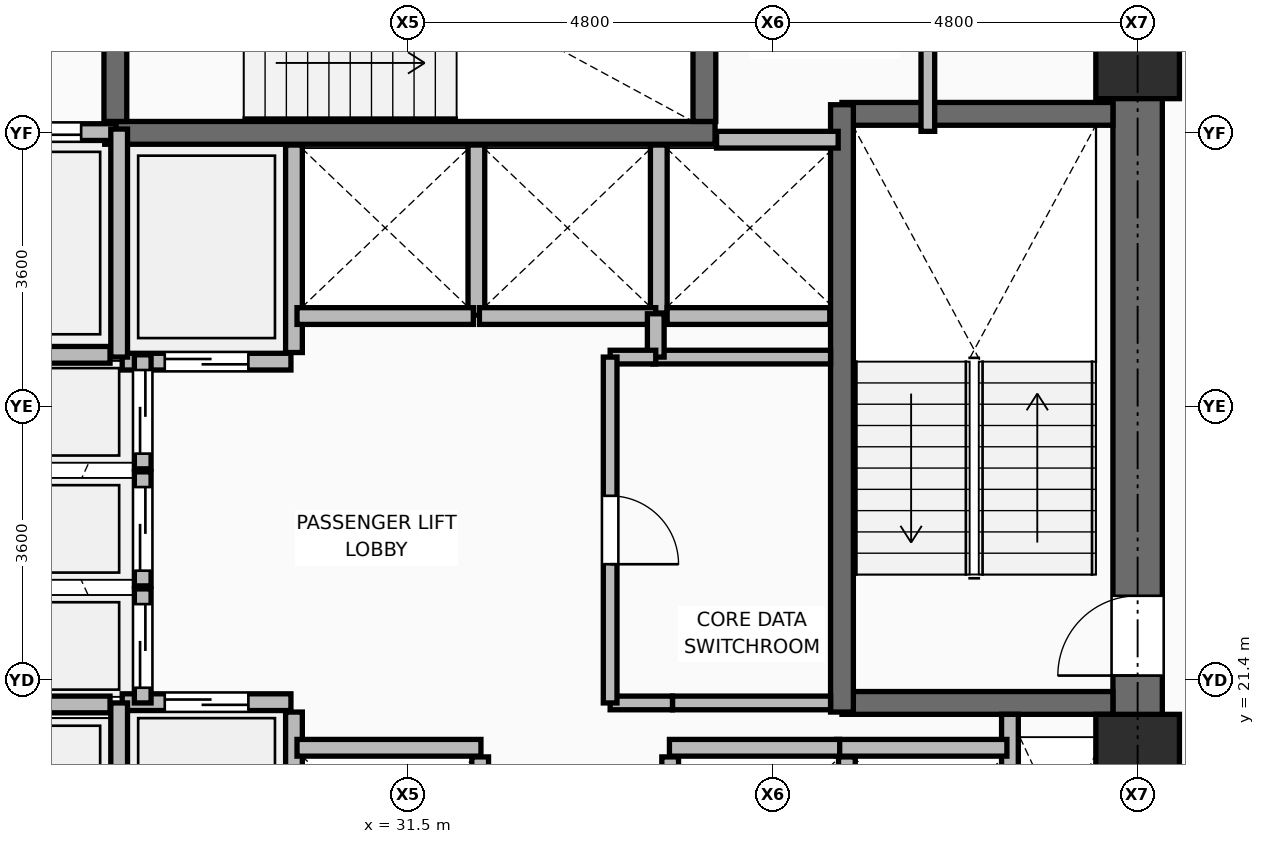
"""IFC4 building model, lengths in metres.
Left out: names, types, materials, properties, quantities, classifications, styles, units other than length and angle.
Written with IfcOpenShell. Run it as: python <this file> out.ifc"""

import sys

from ifc_helpers import new_model, si_unit, direction, frame, frame_2d, origin, origin_2d, place, context, subcontext, project, spatial, rectangle, extrude, element, fill, save


model = new_model("IFC4")
c1 = context("Model", 3, precision=1e-05, world=origin(), true_north=direction((0.0, 1.0)))
c2 = subcontext(c1, "Body", "Model", "MODEL_VIEW")
j1 = project(units=[si_unit("LENGTHUNIT", "METRE"), si_unit("PLANEANGLEUNIT", "RADIAN")], contexts=[c1])
p1 = place(None, origin())
s1 = spatial("IfcSite", under=j1, at=p1, CompositionType="ELEMENT")
p2 = place(p1, origin())
s2 = spatial("IfcBuilding", under=s1, at=p2, CompositionType="ELEMENT")
p3 = place(p2, frame((0.0, 0.0, 72.0)))
s3 = spatial("IfcBuildingStorey", under=s2, at=p3, CompositionType="ELEMENT", Elevation=72.0)
for number, where, z_axis, x_axis in (
    (1, (41.1, 20.4, 0.0), (0.0, 0.0, 1.0), (1.0, 0.0, 0.0)),
    (2, (41.1, 29.6, 0.0), (0.0, 0.0, 1.0), (1.0, 0.0, 0.0)),
):
    element("IfcColumn", number, at=place(p3, frame(where, z_axis=z_axis, x_axis=x_axis)), inside=s3, PredefinedType="COLUMN", context=c2, shape_type="SweptSolid", body=[
        extrude(rectangle(XDim=1.1, YDim=1.1, at=origin_2d()), origin(), (0.0, 0.0, 1.0), 3.75),
    ])
p4 = place(p3, frame((30.0, 18.08, 0.0), z_axis=(0.0, 0.0, 1.0), x_axis=(0.0, 1.0, 0.0)))
e3 = element("IfcWall", 3, at=p4, inside=s3, PredefinedType="PARTITIONING", context=c2, shape_type="SweptSolid", body=[
    extrude(rectangle(XDim=2.9, YDim=0.22, at=frame_2d((1.45, 0.0))), origin(), (0.0, 0.0, 1.0), 3.545),
])
for number, where, z_axis, x_axis in (
    (4, (32.45, 17.92, 0.0), (0.0, 0.0, 1.0), (0.0, 1.0, 0.0)),
    (5, (34.95, 17.92, 0.0), (0.0, 0.0, 1.0), (0.0, 1.0, 0.0)),
):
    element("IfcWall", number, at=place(p3, frame(where, z_axis=z_axis, x_axis=x_axis)), inside=s3, PredefinedType="PARTITIONING", context=c2, shape_type="SweptSolid", body=[
        extrude(rectangle(XDim=2.47, YDim=0.22, at=frame_2d((1.235, 0.0))), origin(), (0.0, 0.0, 1.0), 2.928),
    ])
p5 = place(p3, frame((37.275, 18.08, 0.0), z_axis=(0.0, 0.0, 1.0), x_axis=(0.0, 1.0, 0.0)))
e6 = element("IfcWall", 6, at=p5, inside=s3, PredefinedType="PARTITIONING", context=c2, shape_type="SweptSolid", body=[
    extrude(rectangle(XDim=2.31, YDim=0.22, at=frame_2d((1.155, 0.0))), origin(), (0.0, 0.0, 1.0), 3.545),
])
p6 = place(p3, frame((30.0, 25.71, 0.0), z_axis=(0.0, 0.0, 1.0), x_axis=(0.0, 1.0, 0.0)))
e7 = element("IfcWall", 7, at=p6, inside=s3, PredefinedType="PARTITIONING", context=c2, shape_type="SweptSolid", body=[
    extrude(rectangle(XDim=2.73, YDim=0.22, at=frame_2d((1.365, 0.0))), origin(), (0.0, 0.0, 1.0), 3.545),
])
p7 = place(p3, frame((32.4, 26.2, 0.0), z_axis=(0.0, 0.0, 1.0), x_axis=(0.0, 1.0, 0.0)))
e8 = element("IfcWall", 8, at=p7, inside=s3, PredefinedType="PARTITIONING", context=c2, shape_type="SweptSolid", body=[
    extrude(rectangle(XDim=2.24, YDim=0.22, at=frame_2d((1.12, 0.0))), origin(), (0.0, 0.0, 1.0), 3.545),
])
p8 = place(p3, frame((34.8, 26.23, 0.0), z_axis=(0.0, 0.0, 1.0), x_axis=(0.0, 1.0, 0.0)))
e9 = element("IfcWall", 9, at=p8, inside=s3, PredefinedType="PARTITIONING", context=c2, shape_type="SweptSolid", body=[
    extrude(rectangle(XDim=2.21, YDim=0.22, at=frame_2d((1.105, 0.0))), origin(), (0.0, 0.0, 1.0), 3.545),
])
p9 = place(p3, frame((34.91, 26.19, 0.0), z_axis=(0.0, 0.0, 1.0), x_axis=(1.0, 0.0, 0.0)))
e10 = element("IfcWall", 10, at=p9, inside=s3, PredefinedType="PARTITIONING", context=c2, shape_type="SweptSolid", body=[
    extrude(rectangle(XDim=2.14, YDim=0.22, at=frame_2d((1.07, 0.0))), origin(), (0.0, 0.0, 1.0), 3.545),
])
p10 = place(p3, frame((41.1, 18.125, 0.0), z_axis=(0.0, 0.0, 1.0), x_axis=(0.0, 1.0, 0.0)))
e11 = element("IfcWall", 11, at=p10, inside=s3, PredefinedType="SHEAR", context=c2, shape_type="SweptSolid", body=[
    extrude(rectangle(XDim=14.0, YDim=0.65, at=frame_2d((7.0, 0.0))), origin(), (0.0, 0.0, 1.0), 3.57),
])
p11 = place(p10, frame((3.335, 0.0, 0.0)))
e12 = element("IfcOpeningElement", 12, at=p11, cuts=e11, PredefinedType="OPENING", context=c2, shape_type="SweptSolid", body=[
    extrude(rectangle(XDim=1.05, YDim=2.1, at=frame_2d((0.525, 1.05))), frame((0.0, 0.335, 0.0), z_axis=(0.0, -1.0, 0.0), x_axis=(1.0, 0.0, 0.0)), (0.0, 0.0, 1.0), 0.67),
])
for number, where, z_axis, x_axis in (
    (13, (37.21, 21.1, 0.0), (0.0, 0.0, 1.0), (1.0, 0.0, 0.0)),
    (14, (37.21, 28.85, 0.0), (0.0, 0.0, 1.0), (1.0, 0.0, 0.0)),
):
    element("IfcWall", number, at=place(p3, frame(where, z_axis=z_axis, x_axis=x_axis)), inside=s3, PredefinedType="SHEAR", context=c2, shape_type="SweptSolid", body=[
        extrude(rectangle(XDim=3.565, YDim=0.3, at=frame_2d((1.782, 0.0))), origin(), (0.0, 0.0, 1.0), 3.57),
    ])
p12 = place(p3, frame((37.21, 20.98, 0.0), z_axis=(0.0, 0.0, 1.0), x_axis=(0.0, 1.0, 0.0)))
e15 = element("IfcWall", 15, at=p12, inside=s3, PredefinedType="SHEAR", context=c2, shape_type="SweptSolid", body=[
    extrude(rectangle(XDim=7.99, YDim=0.3, at=frame_2d((3.995, 0.0))), origin(), (0.0, 0.0, 1.0), 3.57),
])
p13 = place(p3, frame((27.51, 28.6, 0.0), z_axis=(0.0, 0.0, 1.0), x_axis=(1.0, 0.0, 0.0)))
e16 = element("IfcWall", 16, at=p13, inside=s3, PredefinedType="SHEAR", context=c2, shape_type="SweptSolid", body=[
    extrude(rectangle(XDim=8.03, YDim=0.3, at=frame_2d((4.015, 0.0))), origin(), (0.0, 0.0, 1.0), 3.57),
])
p14 = place(p3, frame((27.65, 28.75, 0.0), z_axis=(0.0, 0.0, 1.0), x_axis=(0.0, 1.0, 0.0)))
e17 = element("IfcWall", 17, at=p14, inside=s3, PredefinedType="SHEAR", context=c2, shape_type="SweptSolid", body=[
    extrude(rectangle(XDim=3.375, YDim=0.3, at=frame_2d((1.688, 0.0))), origin(), (0.0, 0.0, 1.0), 3.57),
])
p15 = place(p14, frame((1.0, 0.0, 0.0)))
e18 = element("IfcOpeningElement", 18, at=p15, cuts=e17, PredefinedType="OPENING", context=c2, shape_type="SweptSolid", body=[
    extrude(rectangle(XDim=1.05, YDim=2.1, at=frame_2d((0.525, 1.05))), frame((0.0, 0.16, 0.0), z_axis=(0.0, -1.0, 0.0), x_axis=(1.0, 0.0, 0.0)), (0.0, 0.0, 1.0), 0.32),
])
p16 = place(p3, frame((35.4, 28.75, 0.0), z_axis=(0.0, 0.0, 1.0), x_axis=(0.0, 1.0, 0.0)))
e19 = element("IfcWall", 19, at=p16, inside=s3, PredefinedType="SHEAR", context=c2, shape_type="SweptSolid", body=[
    extrude(rectangle(XDim=3.375, YDim=0.3, at=frame_2d((1.688, 0.0))), origin(), (0.0, 0.0, 1.0), 3.57),
])
p17 = place(p3, frame((39.42, 18.125, 0.0), z_axis=(0.0, 0.0, 1.0), x_axis=(0.0, 1.0, 0.0)))
e20 = element("IfcWall", 20, at=p17, inside=s3, PredefinedType="PARTITIONING", context=c2, shape_type="SweptSolid", body=[
    extrude(rectangle(XDim=2.825, YDim=0.22, at=frame_2d((1.413, 0.0))), origin(), (0.0, 0.0, 1.0), 3.55),
])
p18 = place(p3, frame((25.64, 28.61, 0.0), z_axis=(0.0, 0.0, 1.0), x_axis=(1.0, 0.0, 0.0)))
e21 = element("IfcWall", 21, at=p18, inside=s3, PredefinedType="PARTITIONING", context=c2, shape_type="SweptSolid", body=[
    extrude(rectangle(XDim=2.02, YDim=0.22, at=frame_2d((1.01, 0.0))), origin(), (0.0, 0.0, 1.0), 3.55),
])
p19 = place(p18, frame((0.46, 0.0, 0.0)))
e22 = element("IfcOpeningElement", 22, at=p19, cuts=e21, PredefinedType="OPENING", context=c2, shape_type="SweptSolid", body=[
    extrude(rectangle(XDim=1.1, YDim=2.2, at=frame_2d((0.55, 1.1))), frame((0.0, 0.12, 0.0), z_axis=(0.0, -1.0, 0.0), x_axis=(1.0, 0.0, 0.0)), (0.0, 0.0, 1.0), 0.24),
])
p20 = place(p3, frame((27.74, 21.11, 0.0), z_axis=(0.0, 0.0, 1.0), x_axis=(1.0, 0.0, 0.0)))
e23 = element("IfcWall", 23, at=p20, inside=s3, PredefinedType="PARTITIONING", context=c2, shape_type="SweptSolid", body=[
    extrude(rectangle(XDim=2.22, YDim=0.22, at=frame_2d((1.11, 0.0))), origin(), (0.0, 0.0, 1.0), 3.55),
])
p21 = place(p20, frame((0.56, 0.0, 0.0)))
e24 = element("IfcOpeningElement", 24, at=p21, cuts=e23, PredefinedType="OPENING", context=c2, shape_type="SweptSolid", body=[
    extrude(rectangle(XDim=1.1, YDim=2.2, at=frame_2d((0.55, 1.1))), frame((0.0, 0.12, 0.0), z_axis=(0.0, -1.0, 0.0), x_axis=(1.0, 0.0, 0.0)), (0.0, 0.0, 1.0), 0.24),
])
p22 = place(p3, frame((27.74, 25.59, 0.0), z_axis=(0.0, 0.0, 1.0), x_axis=(1.0, 0.0, 0.0)))
e25 = element("IfcWall", 25, at=p22, inside=s3, PredefinedType="PARTITIONING", context=c2, shape_type="SweptSolid", body=[
    extrude(rectangle(XDim=2.22, YDim=0.22, at=frame_2d((1.11, 0.0))), origin(), (0.0, 0.0, 1.0), 3.55),
])
p23 = place(p22, frame((0.56, 0.0, 0.0)))
e26 = element("IfcOpeningElement", 26, at=p23, cuts=e25, PredefinedType="OPENING", context=c2, shape_type="SweptSolid", body=[
    extrude(rectangle(XDim=1.1, YDim=2.2, at=frame_2d((0.55, 1.1))), frame((0.0, 0.12, 0.0), z_axis=(0.0, -1.0, 0.0), x_axis=(1.0, 0.0, 0.0)), (0.0, 0.0, 1.0), 0.24),
])
p24 = place(p3, frame((30.04, 20.51, 0.0), z_axis=(0.0, 0.0, 1.0), x_axis=(1.0, 0.0, 0.0)))
e27 = element("IfcWall", 27, at=p24, inside=s3, PredefinedType="PARTITIONING", context=c2, shape_type="SweptSolid", body=[
    extrude(rectangle(XDim=2.42, YDim=0.22, at=frame_2d((1.21, 0.0))), origin(), (0.0, 0.0, 1.0), 3.55),
])
for number, where, z_axis, x_axis in (
    (28, (37.14, 20.51, 0.0), (0.0, 0.0, 1.0), (1.0, 0.0, 0.0)),
    (29, (34.94, 20.51, 0.0), (0.0, 0.0, 1.0), (1.0, 0.0, 0.0)),
):
    element("IfcWall", number, at=place(p3, frame(where, z_axis=z_axis, x_axis=x_axis)), inside=s3, PredefinedType="PARTITIONING", context=c2, shape_type="SweptSolid", body=[
        extrude(rectangle(XDim=2.24, YDim=0.22, at=frame_2d((1.12, 0.0))), origin(), (0.0, 0.0, 1.0), 3.55),
    ])
for number, where, z_axis, x_axis in (
    (30, (30.04, 26.19, 0.0), (0.0, 0.0, 1.0), (1.0, 0.0, 0.0)),
    (31, (32.44, 26.19, 0.0), (0.0, 0.0, 1.0), (1.0, 0.0, 0.0)),
):
    element("IfcWall", number, at=place(p3, frame(where, z_axis=z_axis, x_axis=x_axis)), inside=s3, PredefinedType="PARTITIONING", context=c2, shape_type="SweptSolid", body=[
        extrude(rectangle(XDim=2.32, YDim=0.22, at=frame_2d((1.16, 0.0))), origin(), (0.0, 0.0, 1.0), 3.55),
    ])
p25 = place(p3, frame((35.56, 28.51, 0.0), z_axis=(0.0, 0.0, 1.0), x_axis=(1.0, 0.0, 0.0)))
e32 = element("IfcWall", 32, at=p25, inside=s3, PredefinedType="PARTITIONING", context=c2, shape_type="SweptSolid", body=[
    extrude(rectangle(XDim=1.6, YDim=0.22, at=frame_2d((0.8, 0.0))), origin(), (0.0, 0.0, 1.0), 3.55),
])
p26 = place(p3, frame((28.01, 21.1, 0.0), z_axis=(0.0, 0.0, 1.0), x_axis=(0.0, 1.0, 0.0)))
e33 = element("IfcWall", 33, at=p26, inside=s3, PredefinedType="PARTITIONING", context=c2, shape_type="SweptSolid", body=[
    extrude(rectangle(XDim=1.5, YDim=0.22, at=frame_2d((0.75, 0.0))), origin(), (0.0, 0.0, 1.0), 3.55),
])
p27 = place(p26, frame((0.2, 0.0, 0.0)))
e34 = element("IfcOpeningElement", 34, at=p27, cuts=e33, PredefinedType="OPENING", context=c2, shape_type="SweptSolid", body=[
    extrude(rectangle(XDim=1.1, YDim=2.2, at=frame_2d((0.55, 1.1))), frame((0.0, 0.12, 0.0), z_axis=(0.0, -1.0, 0.0), x_axis=(1.0, 0.0, 0.0)), (0.0, 0.0, 1.0), 0.24),
])
p28 = place(p3, frame((28.01, 22.64, 0.0), z_axis=(0.0, 0.0, 1.0), x_axis=(0.0, 1.0, 0.0)))
e35 = element("IfcWall", 35, at=p28, inside=s3, PredefinedType="PARTITIONING", context=c2, shape_type="SweptSolid", body=[
    extrude(rectangle(XDim=1.5, YDim=0.22, at=frame_2d((0.75, 0.0))), origin(), (0.0, 0.0, 1.0), 3.55),
])
p29 = place(p28, frame((0.2, 0.0, 0.0)))
e36 = element("IfcOpeningElement", 36, at=p29, cuts=e35, PredefinedType="OPENING", context=c2, shape_type="SweptSolid", body=[
    extrude(rectangle(XDim=1.1, YDim=2.2, at=frame_2d((0.55, 1.1))), frame((0.0, 0.12, 0.0), z_axis=(0.0, -1.0, 0.0), x_axis=(1.0, 0.0, 0.0)), (0.0, 0.0, 1.0), 0.24),
])
p30 = place(p3, frame((28.01, 24.18, 0.0), z_axis=(0.0, 0.0, 1.0), x_axis=(0.0, 1.0, 0.0)))
e37 = element("IfcWall", 37, at=p30, inside=s3, PredefinedType="PARTITIONING", context=c2, shape_type="SweptSolid", body=[
    extrude(rectangle(XDim=1.5, YDim=0.22, at=frame_2d((0.75, 0.0))), origin(), (0.0, 0.0, 1.0), 3.55),
])
p31 = place(p30, frame((0.2, 0.0, 0.0)))
e38 = element("IfcOpeningElement", 38, at=p31, cuts=e37, PredefinedType="OPENING", context=c2, shape_type="SweptSolid", body=[
    extrude(rectangle(XDim=1.1, YDim=2.2, at=frame_2d((0.55, 1.1))), frame((0.0, 0.12, 0.0), z_axis=(0.0, -1.0, 0.0), x_axis=(1.0, 0.0, 0.0)), (0.0, 0.0, 1.0), 0.24),
])
p32 = place(p3, frame((27.7, 18.15, 0.0), z_axis=(0.0, 0.0, 1.0), x_axis=(0.0, 1.0, 0.0)))
e39 = element("IfcWall", 39, at=p32, inside=s3, PredefinedType="PARTITIONING", context=c2, shape_type="SweptSolid", body=[
    extrude(rectangle(XDim=2.95, YDim=0.22, at=frame_2d((1.475, 0.0))), origin(), (0.0, 0.0, 1.0), 3.55),
])
p33 = place(p3, frame((27.7, 25.65, 0.0), z_axis=(0.0, 0.0, 1.0), x_axis=(0.0, 1.0, 0.0)))
e40 = element("IfcWall", 40, at=p33, inside=s3, PredefinedType="PARTITIONING", context=c2, shape_type="SweptSolid", body=[
    extrude(rectangle(XDim=3.0, YDim=0.22, at=frame_2d((1.5, 0.0))), origin(), (0.0, 0.0, 1.0), 3.55),
])
for number, where, z_axis, x_axis in (
    (41, (25.88, 21.08, 0.0), (0.0, 0.0, 1.0), (1.0, 0.0, 0.0)),
    (42, (25.88, 25.68, 0.0), (0.0, 0.0, 1.0), (1.0, 0.0, 0.0)),
):
    element("IfcWall", number, at=place(p3, frame(where, z_axis=z_axis, x_axis=x_axis)), inside=s3, PredefinedType="PARTITIONING", context=c2, shape_type="SweptSolid", body=[
        extrude(rectangle(XDim=1.7, YDim=0.22, at=frame_2d((0.85, 0.0))), origin(), (0.0, 0.0, 1.0), 3.55),
    ])
p34 = place(p3, frame((34.98, 21.1, 0.0), z_axis=(0.0, 0.0, 1.0), x_axis=(1.0, 0.0, 0.0)))
e43 = element("IfcWall", 43, at=p34, inside=s3, PredefinedType="PARTITIONING", context=c2, shape_type="SweptSolid", body=[
    extrude(rectangle(XDim=2.08, YDim=0.18, at=frame_2d((1.04, 0.0))), origin(), (0.0, 0.0, 1.0), 3.55),
])
p35 = place(p3, frame((34.72, 25.65, 0.0), z_axis=(0.0, 0.0, 1.0), x_axis=(1.0, 0.0, 0.0)))
e44 = element("IfcWall", 44, at=p35, inside=s3, PredefinedType="PARTITIONING", context=c2, shape_type="SweptSolid", body=[
    extrude(rectangle(XDim=2.34, YDim=0.18, at=frame_2d((1.17, 0.0))), origin(), (0.0, 0.0, 1.0), 3.55),
])
p36 = place(p3, frame((34.76, 25.65, 0.0), z_axis=(0.0, 0.0, 1.0), x_axis=(0.0, 1.0, 0.0)))
e45 = element("IfcWall", 45, at=p36, inside=s3, PredefinedType="PARTITIONING", context=c2, shape_type="SweptSolid", body=[
    extrude(rectangle(XDim=0.57, YDim=0.22, at=frame_2d((0.285, 0.0))), origin(), (0.0, 0.0, 1.0), 3.55),
])
p37 = place(p3, frame((34.16, 21.1, 0.0), z_axis=(0.0, 0.0, 1.0), x_axis=(1.0, 0.0, 0.0)))
e46 = element("IfcWall", 46, at=p37, inside=s3, PredefinedType="PARTITIONING", context=c2, shape_type="SweptSolid", body=[
    extrude(rectangle(XDim=0.82, YDim=0.18, at=frame_2d((0.41, 0.0))), origin(), (0.0, 0.0, 1.0), 3.55),
])
p38 = place(p3, frame((34.16, 25.65, 0.0), z_axis=(0.0, 0.0, 1.0), x_axis=(1.0, 0.0, 0.0)))
e47 = element("IfcWall", 47, at=p38, inside=s3, PredefinedType="PARTITIONING", context=c2, shape_type="SweptSolid", body=[
    extrude(rectangle(XDim=0.6, YDim=0.18, at=frame_2d((0.3, 0.0))), origin(), (0.0, 0.0, 1.0), 3.55),
])
p39 = place(p3, frame((34.16, 21.1, 0.0), z_axis=(0.0, 0.0, 1.0), x_axis=(0.0, 1.0, 0.0)))
e48 = element("IfcWall", 48, at=p39, inside=s3, PredefinedType="PARTITIONING", context=c2, shape_type="SweptSolid", body=[
    extrude(rectangle(XDim=4.55, YDim=0.18, at=frame_2d((2.275, 0.0))), origin(), (0.0, 0.0, 1.0), 3.55),
])
p40 = place(p39, frame((1.825, 0.0, 0.0)))
e49 = element("IfcOpeningElement", 49, at=p40, cuts=e48, PredefinedType="OPENING", context=c2, shape_type="SweptSolid", body=[
    extrude(rectangle(XDim=0.9, YDim=2.1, at=frame_2d((0.45, 1.05))), frame((0.0, 0.1, 0.0), z_axis=(0.0, -1.0, 0.0), x_axis=(1.0, 0.0, 0.0)), (0.0, 0.0, 1.0), 0.2),
])
p41 = place(p3, frame((38.34, 28.62, 0.0), z_axis=(0.0, 0.0, 1.0), x_axis=(0.0, 1.0, 0.0)))
e50 = element("IfcWall", 50, at=p41, inside=s3, PredefinedType="PARTITIONING", context=c2, shape_type="SweptSolid", body=[
    extrude(rectangle(XDim=3.505, YDim=0.18, at=frame_2d((1.752, 0.0))), origin(), (0.0, 0.0, 1.0), 3.55),
])
p42 = place(p11, origin())
e51 = element("IfcDoor", 51, at=p42, inside=s3, OperationType="SINGLE_SWING_LEFT", PredefinedType="DOOR", context=c2, shape_type="SweptSolid", body=[
    extrude(rectangle(XDim=1.05, YDim=2.1, at=frame_2d((0.525, 1.05))), frame((0.0, 0.025, 0.0), z_axis=(0.0, -1.0, 0.0), x_axis=(1.0, 0.0, 0.0)), (0.0, 0.0, 1.0), 0.05),
])
fill(e12, e51)
p43 = place(p19, origin())
e52 = element("IfcDoor", 52, at=p43, inside=s3, OperationType="DOUBLE_DOOR_SLIDING", PredefinedType="DOOR", context=c2, shape_type="SweptSolid", body=[
    extrude(rectangle(XDim=1.1, YDim=2.2, at=frame_2d((0.55, 1.1))), frame((0.0, 0.025, 0.0), z_axis=(0.0, -1.0, 0.0), x_axis=(1.0, 0.0, 0.0)), (0.0, 0.0, 1.0), 0.05),
])
fill(e22, e52)
p44 = place(p21, origin())
e53 = element("IfcDoor", 53, at=p44, inside=s3, OperationType="DOUBLE_DOOR_SLIDING", PredefinedType="DOOR", context=c2, shape_type="SweptSolid", body=[
    extrude(rectangle(XDim=1.1, YDim=2.2, at=frame_2d((0.55, 1.1))), frame((0.0, 0.025, 0.0), z_axis=(0.0, -1.0, 0.0), x_axis=(1.0, 0.0, 0.0)), (0.0, 0.0, 1.0), 0.05),
])
fill(e24, e53)
p45 = place(p23, frame((1.1, 0.0, 0.0), z_axis=(0.0, 0.0, 1.0), x_axis=(-1.0, 0.0, 0.0)))
e54 = element("IfcDoor", 54, at=p45, inside=s3, OperationType="DOUBLE_DOOR_SLIDING", PredefinedType="DOOR", context=c2, shape_type="SweptSolid", body=[
    extrude(rectangle(XDim=1.1, YDim=2.2, at=frame_2d((0.55, 1.1))), frame((0.0, 0.025, 0.0), z_axis=(0.0, -1.0, 0.0), x_axis=(1.0, 0.0, 0.0)), (0.0, 0.0, 1.0), 0.05),
])
fill(e26, e54)
p46 = place(p27, frame((1.1, 0.0, 0.0), z_axis=(0.0, 0.0, 1.0), x_axis=(-1.0, 0.0, 0.0)))
e55 = element("IfcDoor", 55, at=p46, inside=s3, OperationType="DOUBLE_DOOR_SLIDING", PredefinedType="DOOR", context=c2, shape_type="SweptSolid", body=[
    extrude(rectangle(XDim=1.1, YDim=2.2, at=frame_2d((0.55, 1.1))), frame((0.0, 0.025, 0.0), z_axis=(0.0, -1.0, 0.0), x_axis=(1.0, 0.0, 0.0)), (0.0, 0.0, 1.0), 0.05),
])
fill(e34, e55)
p47 = place(p29, frame((1.1, 0.0, 0.0), z_axis=(0.0, 0.0, 1.0), x_axis=(-1.0, 0.0, 0.0)))
e56 = element("IfcDoor", 56, at=p47, inside=s3, OperationType="DOUBLE_DOOR_SLIDING", PredefinedType="DOOR", context=c2, shape_type="SweptSolid", body=[
    extrude(rectangle(XDim=1.1, YDim=2.2, at=frame_2d((0.55, 1.1))), frame((0.0, 0.025, 0.0), z_axis=(0.0, -1.0, 0.0), x_axis=(1.0, 0.0, 0.0)), (0.0, 0.0, 1.0), 0.05),
])
fill(e36, e56)
p48 = place(p31, frame((1.1, 0.0, 0.0), z_axis=(0.0, 0.0, 1.0), x_axis=(-1.0, 0.0, 0.0)))
e57 = element("IfcDoor", 57, at=p48, inside=s3, OperationType="DOUBLE_DOOR_SLIDING", PredefinedType="DOOR", context=c2, shape_type="SweptSolid", body=[
    extrude(rectangle(XDim=1.1, YDim=2.2, at=frame_2d((0.55, 1.1))), frame((0.0, 0.025, 0.0), z_axis=(0.0, -1.0, 0.0), x_axis=(1.0, 0.0, 0.0)), (0.0, 0.0, 1.0), 0.05),
])
fill(e38, e57)
p49 = place(p40, frame((0.9, 0.0, 0.0), z_axis=(0.0, 0.0, 1.0), x_axis=(-1.0, 0.0, 0.0)))
e58 = element("IfcDoor", 58, at=p49, inside=s3, OperationType="SINGLE_SWING_RIGHT", PredefinedType="DOOR", context=c2, shape_type="SweptSolid", body=[
    extrude(rectangle(XDim=0.9, YDim=2.1, at=frame_2d((0.45, 1.05))), frame((0.0, 0.025, 0.0), z_axis=(0.0, -1.0, 0.0), x_axis=(1.0, 0.0, 0.0)), (0.0, 0.0, 1.0), 0.05),
])
fill(e49, e58)
save(model, sys.argv[1])
